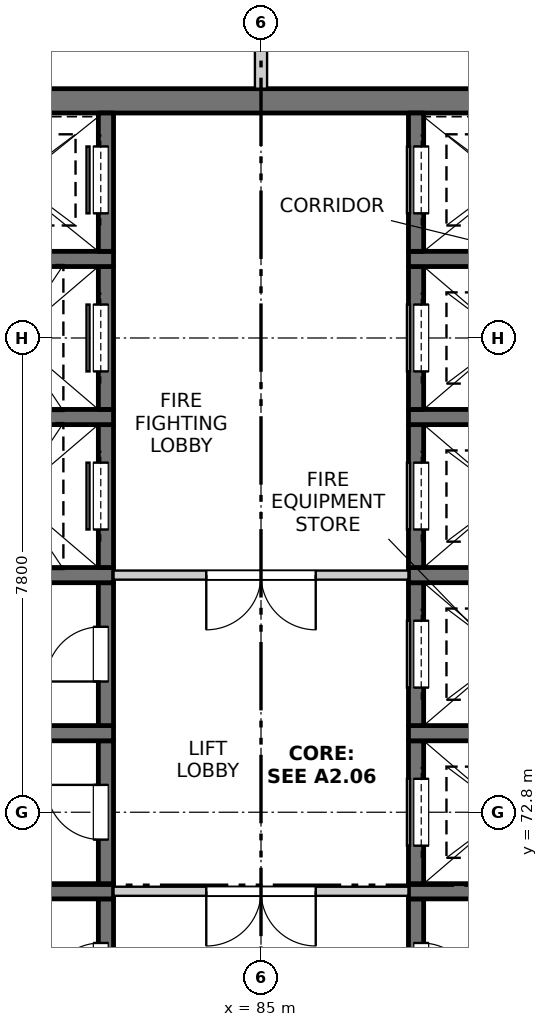
"""IFC4 building model, lengths in metres.
Left out: names, types, materials, properties, quantities, classifications, styles, units other than length and angle.
Written with IfcOpenShell. Run it as: python <this file> out.ifc"""

import sys

from ifc_helpers import new_model, si_unit, direction, frame, frame_2d, origin, place, context, subcontext, project, spatial, rectangle, extrude, element, fill, save


model = new_model("IFC4")
c1 = context("Model", 3, precision=1e-05, world=origin(), true_north=direction((0.0, 1.0)))
c2 = subcontext(c1, "Body", "Model", "MODEL_VIEW")
j1 = project(units=[si_unit("LENGTHUNIT", "METRE"), si_unit("PLANEANGLEUNIT", "RADIAN")], contexts=[c1])
p1 = place(None, origin())
s1 = spatial("IfcSite", under=j1, at=p1, CompositionType="ELEMENT")
p2 = place(p1, origin())
s2 = spatial("IfcBuilding", under=s1, at=p2, CompositionType="ELEMENT")
p3 = place(p2, frame((0.0, 0.0, 234.7)))
s3 = spatial("IfcBuildingStorey", under=s2, at=p3, CompositionType="ELEMENT", Elevation=234.7)
p4 = place(p3, frame((75.45, 84.5, -0.25), z_axis=(0.0, 0.0, 1.0), x_axis=(1.0, 0.0, 0.0)))
e1 = element("IfcWall", 1, at=p4, inside=s3, PredefinedType="SOLIDWALL", context=c2, shape_type="SweptSolid", body=[
    extrude(rectangle(XDim=19.1, YDim=0.4, at=frame_2d((9.55, 0.0))), origin(), (0.0, 0.0, 1.0), 3.4),
])
p5 = place(p3, frame((82.45, 69.025, -0.25), z_axis=(0.0, 0.0, 1.0), x_axis=(0.0, 1.0, 0.0)))
e2 = element("IfcWall", 2, at=p5, inside=s3, PredefinedType="SOLIDWALL", context=c2, shape_type="SweptSolid", body=[
    extrude(rectangle(XDim=2.35, YDim=0.25, at=frame_2d((1.175, 0.0))), origin(), (0.0, 0.0, 1.0), 3.4),
])
p6 = place(p5, frame((0.725, 0.0, 0.25)))
e3 = element("IfcOpeningElement", 3, at=p6, cuts=e2, PredefinedType="OPENING", context=c2, shape_type="SweptSolid", body=[
    extrude(rectangle(XDim=0.9, YDim=2.1, at=frame_2d((0.45, 1.05))), frame((0.0, 0.135, 0.0), z_axis=(0.0, -1.0, 0.0), x_axis=(1.0, 0.0, 0.0)), (0.0, 0.0, 1.0), 0.27),
])
p7 = place(p3, frame((79.575, 71.5, -0.25), z_axis=(0.0, 0.0, 1.0), x_axis=(1.0, 0.0, 0.0)))
e4 = element("IfcWall", 4, at=p7, inside=s3, PredefinedType="SOLIDWALL", context=c2, shape_type="SweptSolid", body=[
    extrude(rectangle(XDim=3.0, YDim=0.25, at=frame_2d((1.5, 0.0))), origin(), (0.0, 0.0, 1.0), 3.4),
])
p8 = place(p3, frame((82.45, 71.625, -0.25), z_axis=(0.0, 0.0, 1.0), x_axis=(0.0, 1.0, 0.0)))
e5 = element("IfcWall", 5, at=p8, inside=s3, PredefinedType="SOLIDWALL", context=c2, shape_type="SweptSolid", body=[
    extrude(rectangle(XDim=2.35, YDim=0.25, at=frame_2d((1.175, 0.0))), origin(), (0.0, 0.0, 1.0), 3.4),
])
p9 = place(p8, frame((0.725, 0.0, 0.25)))
e6 = element("IfcOpeningElement", 6, at=p9, cuts=e5, PredefinedType="OPENING", context=c2, shape_type="SweptSolid", body=[
    extrude(rectangle(XDim=0.9, YDim=2.1, at=frame_2d((0.45, 1.05))), frame((0.0, 0.135, 0.0), z_axis=(0.0, -1.0, 0.0), x_axis=(1.0, 0.0, 0.0)), (0.0, 0.0, 1.0), 0.27),
])
p10 = place(p3, frame((79.575, 74.1, -0.25), z_axis=(0.0, 0.0, 1.0), x_axis=(1.0, 0.0, 0.0)))
e7 = element("IfcWall", 7, at=p10, inside=s3, PredefinedType="SOLIDWALL", context=c2, shape_type="SweptSolid", body=[
    extrude(rectangle(XDim=3.0, YDim=0.25, at=frame_2d((1.5, 0.0))), origin(), (0.0, 0.0, 1.0), 3.4),
])
p11 = place(p3, frame((82.45, 74.225, -0.25), z_axis=(0.0, 0.0, 1.0), x_axis=(0.0, 1.0, 0.0)))
e8 = element("IfcWall", 8, at=p11, inside=s3, PredefinedType="SOLIDWALL", context=c2, shape_type="SweptSolid", body=[
    extrude(rectangle(XDim=2.35, YDim=0.25, at=frame_2d((1.175, 0.0))), origin(), (0.0, 0.0, 1.0), 3.4),
])
p12 = place(p11, frame((0.725, 0.0, 0.25)))
e9 = element("IfcOpeningElement", 9, at=p12, cuts=e8, PredefinedType="OPENING", context=c2, shape_type="SweptSolid", body=[
    extrude(rectangle(XDim=0.9, YDim=2.1, at=frame_2d((0.45, 1.05))), frame((0.0, 0.135, 0.0), z_axis=(0.0, -1.0, 0.0), x_axis=(1.0, 0.0, 0.0)), (0.0, 0.0, 1.0), 0.27),
])
p13 = place(p3, frame((79.575, 76.7, -0.25), z_axis=(0.0, 0.0, 1.0), x_axis=(1.0, 0.0, 0.0)))
e10 = element("IfcWall", 10, at=p13, inside=s3, PredefinedType="SOLIDWALL", context=c2, shape_type="SweptSolid", body=[
    extrude(rectangle(XDim=3.0, YDim=0.25, at=frame_2d((1.5, 0.0))), origin(), (0.0, 0.0, 1.0), 3.4),
])
p14 = place(p3, frame((82.45, 76.825, -0.25), z_axis=(0.0, 0.0, 1.0), x_axis=(0.0, 1.0, 0.0)))
e11 = element("IfcWall", 11, at=p14, inside=s3, PredefinedType="SOLIDWALL", context=c2, shape_type="SweptSolid", body=[
    extrude(rectangle(XDim=2.35, YDim=0.25, at=frame_2d((1.175, 0.0))), origin(), (0.0, 0.0, 1.0), 3.4),
])
p15 = place(p14, frame((0.625, 0.0, 0.25)))
e12 = element("IfcOpeningElement", 12, at=p15, cuts=e11, PredefinedType="OPENING", context=c2, shape_type="SweptSolid", body=[
    extrude(rectangle(XDim=1.1, YDim=2.1, at=frame_2d((0.55, 1.05))), frame((0.0, 0.135, 0.0), z_axis=(0.0, -1.0, 0.0), x_axis=(1.0, 0.0, 0.0)), (0.0, 0.0, 1.0), 0.27),
])
p16 = place(p3, frame((79.575, 79.3, -0.25), z_axis=(0.0, 0.0, 1.0), x_axis=(1.0, 0.0, 0.0)))
e13 = element("IfcWall", 13, at=p16, inside=s3, PredefinedType="SOLIDWALL", context=c2, shape_type="SweptSolid", body=[
    extrude(rectangle(XDim=3.0, YDim=0.25, at=frame_2d((1.5, 0.0))), origin(), (0.0, 0.0, 1.0), 3.4),
])
p17 = place(p3, frame((82.45, 79.425, -0.25), z_axis=(0.0, 0.0, 1.0), x_axis=(0.0, 1.0, 0.0)))
e14 = element("IfcWall", 14, at=p17, inside=s3, PredefinedType="SOLIDWALL", context=c2, shape_type="SweptSolid", body=[
    extrude(rectangle(XDim=2.35, YDim=0.25, at=frame_2d((1.175, 0.0))), origin(), (0.0, 0.0, 1.0), 3.4),
])
p18 = place(p17, frame((0.625, 0.0, 0.25)))
e15 = element("IfcOpeningElement", 15, at=p18, cuts=e14, PredefinedType="OPENING", context=c2, shape_type="SweptSolid", body=[
    extrude(rectangle(XDim=1.1, YDim=2.1, at=frame_2d((0.55, 1.05))), frame((0.0, 0.135, 0.0), z_axis=(0.0, -1.0, 0.0), x_axis=(1.0, 0.0, 0.0)), (0.0, 0.0, 1.0), 0.27),
])
p19 = place(p3, frame((79.575, 81.9, -0.25), z_axis=(0.0, 0.0, 1.0), x_axis=(1.0, 0.0, 0.0)))
e16 = element("IfcWall", 16, at=p19, inside=s3, PredefinedType="SOLIDWALL", context=c2, shape_type="SweptSolid", body=[
    extrude(rectangle(XDim=3.0, YDim=0.25, at=frame_2d((1.5, 0.0))), origin(), (0.0, 0.0, 1.0), 3.4),
])
p20 = place(p3, frame((82.45, 82.025, -0.25), z_axis=(0.0, 0.0, 1.0), x_axis=(0.0, 1.0, 0.0)))
e17 = element("IfcWall", 17, at=p20, inside=s3, PredefinedType="SOLIDWALL", context=c2, shape_type="SweptSolid", body=[
    extrude(rectangle(XDim=2.275, YDim=0.25, at=frame_2d((1.138, 0.0))), origin(), (0.0, 0.0, 1.0), 3.4),
])
p21 = place(p20, frame((0.625, 0.0, 0.25)))
e18 = element("IfcOpeningElement", 18, at=p21, cuts=e17, PredefinedType="OPENING", context=c2, shape_type="SweptSolid", body=[
    extrude(rectangle(XDim=1.1, YDim=2.1, at=frame_2d((0.55, 1.05))), frame((0.0, 0.135, 0.0), z_axis=(0.0, -1.0, 0.0), x_axis=(1.0, 0.0, 0.0)), (0.0, 0.0, 1.0), 0.27),
])
p22 = place(p3, frame((87.55, 69.025, -0.25), z_axis=(0.0, 0.0, 1.0), x_axis=(0.0, 1.0, 0.0)))
e19 = element("IfcWall", 19, at=p22, inside=s3, PredefinedType="SOLIDWALL", context=c2, shape_type="SweptSolid", body=[
    extrude(rectangle(XDim=2.35, YDim=0.25, at=frame_2d((1.175, 0.0))), origin(), (0.0, 0.0, 1.0), 3.4),
])
p23 = place(p22, frame((0.725, 0.0, 0.25)))
e20 = element("IfcOpeningElement", 20, at=p23, cuts=e19, PredefinedType="OPENING", context=c2, shape_type="SweptSolid", body=[
    extrude(rectangle(XDim=0.9, YDim=2.1, at=frame_2d((0.45, 1.05))), frame((0.0, 0.135, 0.0), z_axis=(0.0, -1.0, 0.0), x_axis=(1.0, 0.0, 0.0)), (0.0, 0.0, 1.0), 0.27),
])
p24 = place(p3, frame((87.425, 71.5, -0.25), z_axis=(0.0, 0.0, 1.0), x_axis=(1.0, 0.0, 0.0)))
e21 = element("IfcWall", 21, at=p24, inside=s3, PredefinedType="SOLIDWALL", context=c2, shape_type="SweptSolid", body=[
    extrude(rectangle(XDim=3.0, YDim=0.25, at=frame_2d((1.5, 0.0))), origin(), (0.0, 0.0, 1.0), 3.4),
])
p25 = place(p3, frame((87.55, 71.625, -0.25), z_axis=(0.0, 0.0, 1.0), x_axis=(0.0, 1.0, 0.0)))
e22 = element("IfcWall", 22, at=p25, inside=s3, PredefinedType="SOLIDWALL", context=c2, shape_type="SweptSolid", body=[
    extrude(rectangle(XDim=2.35, YDim=0.25, at=frame_2d((1.175, 0.0))), origin(), (0.0, 0.0, 1.0), 3.4),
])
p26 = place(p25, frame((0.625, 0.0, 0.25)))
e23 = element("IfcOpeningElement", 23, at=p26, cuts=e22, PredefinedType="OPENING", context=c2, shape_type="SweptSolid", body=[
    extrude(rectangle(XDim=1.1, YDim=2.1, at=frame_2d((0.55, 1.05))), frame((0.0, 0.135, 0.0), z_axis=(0.0, -1.0, 0.0), x_axis=(1.0, 0.0, 0.0)), (0.0, 0.0, 1.0), 0.27),
])
p27 = place(p3, frame((87.425, 74.1, -0.25), z_axis=(0.0, 0.0, 1.0), x_axis=(1.0, 0.0, 0.0)))
e24 = element("IfcWall", 24, at=p27, inside=s3, PredefinedType="SOLIDWALL", context=c2, shape_type="SweptSolid", body=[
    extrude(rectangle(XDim=3.0, YDim=0.25, at=frame_2d((1.5, 0.0))), origin(), (0.0, 0.0, 1.0), 3.4),
])
p28 = place(p3, frame((87.55, 74.225, -0.25), z_axis=(0.0, 0.0, 1.0), x_axis=(0.0, 1.0, 0.0)))
e25 = element("IfcWall", 25, at=p28, inside=s3, PredefinedType="SOLIDWALL", context=c2, shape_type="SweptSolid", body=[
    extrude(rectangle(XDim=2.35, YDim=0.25, at=frame_2d((1.175, 0.0))), origin(), (0.0, 0.0, 1.0), 3.4),
])
p29 = place(p28, frame((0.625, 0.0, 0.25)))
e26 = element("IfcOpeningElement", 26, at=p29, cuts=e25, PredefinedType="OPENING", context=c2, shape_type="SweptSolid", body=[
    extrude(rectangle(XDim=1.1, YDim=2.1, at=frame_2d((0.55, 1.05))), frame((0.0, 0.135, 0.0), z_axis=(0.0, -1.0, 0.0), x_axis=(1.0, 0.0, 0.0)), (0.0, 0.0, 1.0), 0.27),
])
p30 = place(p3, frame((87.425, 76.7, -0.25), z_axis=(0.0, 0.0, 1.0), x_axis=(1.0, 0.0, 0.0)))
e27 = element("IfcWall", 27, at=p30, inside=s3, PredefinedType="SOLIDWALL", context=c2, shape_type="SweptSolid", body=[
    extrude(rectangle(XDim=3.0, YDim=0.25, at=frame_2d((1.5, 0.0))), origin(), (0.0, 0.0, 1.0), 3.4),
])
p31 = place(p3, frame((87.55, 76.825, -0.25), z_axis=(0.0, 0.0, 1.0), x_axis=(0.0, 1.0, 0.0)))
e28 = element("IfcWall", 28, at=p31, inside=s3, PredefinedType="SOLIDWALL", context=c2, shape_type="SweptSolid", body=[
    extrude(rectangle(XDim=2.35, YDim=0.25, at=frame_2d((1.175, 0.0))), origin(), (0.0, 0.0, 1.0), 3.4),
])
p32 = place(p31, frame((0.625, 0.0, 0.25)))
e29 = element("IfcOpeningElement", 29, at=p32, cuts=e28, PredefinedType="OPENING", context=c2, shape_type="SweptSolid", body=[
    extrude(rectangle(XDim=1.1, YDim=2.1, at=frame_2d((0.55, 1.05))), frame((0.0, 0.135, 0.0), z_axis=(0.0, -1.0, 0.0), x_axis=(1.0, 0.0, 0.0)), (0.0, 0.0, 1.0), 0.27),
])
p33 = place(p3, frame((87.425, 79.3, -0.25), z_axis=(0.0, 0.0, 1.0), x_axis=(1.0, 0.0, 0.0)))
e30 = element("IfcWall", 30, at=p33, inside=s3, PredefinedType="SOLIDWALL", context=c2, shape_type="SweptSolid", body=[
    extrude(rectangle(XDim=3.0, YDim=0.25, at=frame_2d((1.5, 0.0))), origin(), (0.0, 0.0, 1.0), 3.4),
])
p34 = place(p3, frame((87.55, 79.425, -0.25), z_axis=(0.0, 0.0, 1.0), x_axis=(0.0, 1.0, 0.0)))
e31 = element("IfcWall", 31, at=p34, inside=s3, PredefinedType="SOLIDWALL", context=c2, shape_type="SweptSolid", body=[
    extrude(rectangle(XDim=2.35, YDim=0.25, at=frame_2d((1.175, 0.0))), origin(), (0.0, 0.0, 1.0), 3.4),
])
p35 = place(p34, frame((0.625, 0.0, 0.25)))
e32 = element("IfcOpeningElement", 32, at=p35, cuts=e31, PredefinedType="OPENING", context=c2, shape_type="SweptSolid", body=[
    extrude(rectangle(XDim=1.1, YDim=2.1, at=frame_2d((0.55, 1.05))), frame((0.0, 0.135, 0.0), z_axis=(0.0, -1.0, 0.0), x_axis=(1.0, 0.0, 0.0)), (0.0, 0.0, 1.0), 0.27),
])
p36 = place(p3, frame((87.425, 81.9, -0.25), z_axis=(0.0, 0.0, 1.0), x_axis=(1.0, 0.0, 0.0)))
e33 = element("IfcWall", 33, at=p36, inside=s3, PredefinedType="SOLIDWALL", context=c2, shape_type="SweptSolid", body=[
    extrude(rectangle(XDim=3.0, YDim=0.25, at=frame_2d((1.5, 0.0))), origin(), (0.0, 0.0, 1.0), 3.4),
])
p37 = place(p3, frame((87.55, 82.025, -0.25), z_axis=(0.0, 0.0, 1.0), x_axis=(0.0, 1.0, 0.0)))
e34 = element("IfcWall", 34, at=p37, inside=s3, PredefinedType="SOLIDWALL", context=c2, shape_type="SweptSolid", body=[
    extrude(rectangle(XDim=2.275, YDim=0.25, at=frame_2d((1.138, 0.0))), origin(), (0.0, 0.0, 1.0), 3.4),
])
p38 = place(p37, frame((0.625, 0.0, 0.25)))
e35 = element("IfcOpeningElement", 35, at=p38, cuts=e34, PredefinedType="OPENING", context=c2, shape_type="SweptSolid", body=[
    extrude(rectangle(XDim=1.1, YDim=2.1, at=frame_2d((0.55, 1.05))), frame((0.0, 0.135, 0.0), z_axis=(0.0, -1.0, 0.0), x_axis=(1.0, 0.0, 0.0)), (0.0, 0.0, 1.0), 0.27),
])
p39 = place(p3, frame((82.575, 71.5, 0.0), z_axis=(0.0, 0.0, 1.0), x_axis=(1.0, 0.0, 0.0)))
e36 = element("IfcWall", 36, at=p39, inside=s3, PredefinedType="PARTITIONING", context=c2, shape_type="SweptSolid", body=[
    extrude(rectangle(XDim=4.85, YDim=0.15, at=frame_2d((2.425, 0.0))), origin(), (0.0, 0.0, 1.0), 3.15),
])
p40 = place(p39, frame((1.525, 0.0, 0.0)))
e37 = element("IfcOpeningElement", 37, at=p40, cuts=e36, PredefinedType="OPENING", context=c2, shape_type="SweptSolid", body=[
    extrude(rectangle(XDim=1.8, YDim=2.1, at=frame_2d((0.9, 1.05))), frame((0.0, 0.085, 0.0), z_axis=(0.0, -1.0, 0.0), x_axis=(1.0, 0.0, 0.0)), (0.0, 0.0, 1.0), 0.17),
])
p41 = place(p3, frame((82.575, 76.7, 0.0), z_axis=(0.0, 0.0, 1.0), x_axis=(1.0, 0.0, 0.0)))
e38 = element("IfcWall", 38, at=p41, inside=s3, PredefinedType="PARTITIONING", context=c2, shape_type="SweptSolid", body=[
    extrude(rectangle(XDim=4.85, YDim=0.15, at=frame_2d((2.425, 0.0))), origin(), (0.0, 0.0, 1.0), 3.15),
])
p42 = place(p41, frame((1.525, 0.0, 0.0)))
e39 = element("IfcOpeningElement", 39, at=p42, cuts=e38, PredefinedType="OPENING", context=c2, shape_type="SweptSolid", body=[
    extrude(rectangle(XDim=1.8, YDim=2.1, at=frame_2d((0.9, 1.05))), frame((0.0, 0.085, 0.0), z_axis=(0.0, -1.0, 0.0), x_axis=(1.0, 0.0, 0.0)), (0.0, 0.0, 1.0), 0.17),
])
p43 = place(p3, frame((85.0, 84.7, 0.0), z_axis=(0.0, 0.0, 1.0), x_axis=(0.0, 1.0, 0.0)))
e40 = element("IfcWall", 40, at=p43, inside=s3, PredefinedType="PARTITIONING", context=c2, shape_type="SweptSolid", body=[
    extrude(rectangle(XDim=3.4, YDim=0.2, at=frame_2d((1.7, 0.0))), origin(), (0.0, 0.0, 1.0), 3.15),
])
p44 = place(p6, origin())
e41 = element("IfcDoor", 41, at=p44, inside=s3, OperationType="SINGLE_SWING_LEFT", PredefinedType="DOOR", context=c2, shape_type="SweptSolid", body=[
    extrude(rectangle(XDim=0.9, YDim=2.1, at=frame_2d((0.45, 1.05))), frame((0.0, 0.11, 0.0), z_axis=(0.0, -1.0, 0.0), x_axis=(1.0, 0.0, 0.0)), (0.0, 0.0, 1.0), 0.05),
])
fill(e3, e41)
p45 = place(p23, origin())
e42 = element("IfcDoor", 42, at=p45, inside=s3, OperationType="SINGLE_SWING_RIGHT", PredefinedType="DOOR", context=c2, shape_type="SweptSolid", body=[
    extrude(rectangle(XDim=0.9, YDim=2.1, at=frame_2d((0.45, 1.05))), frame((0.0, -0.06, 0.0), z_axis=(0.0, -1.0, 0.0), x_axis=(1.0, 0.0, 0.0)), (0.0, 0.0, 1.0), 0.05),
])
fill(e20, e42)
p46 = place(p40, origin())
e43 = element("IfcDoor", 43, at=p46, inside=s3, OperationType="DOUBLE_DOOR_SINGLE_SWING", PredefinedType="DOOR", context=c2, shape_type="SweptSolid", body=[
    extrude(rectangle(XDim=1.8, YDim=2.1, at=frame_2d((0.9, 1.05))), frame((0.0, 0.025, 0.0), z_axis=(0.0, -1.0, 0.0), x_axis=(1.0, 0.0, 0.0)), (0.0, 0.0, 1.0), 0.05),
])
fill(e37, e43)
p47 = place(p9, origin())
e44 = element("IfcDoor", 44, at=p47, inside=s3, OperationType="SINGLE_SWING_RIGHT", PredefinedType="DOOR", context=c2, shape_type="SweptSolid", body=[
    extrude(rectangle(XDim=0.9, YDim=2.1, at=frame_2d((0.45, 1.05))), frame((0.0, 0.11, 0.0), z_axis=(0.0, -1.0, 0.0), x_axis=(1.0, 0.0, 0.0)), (0.0, 0.0, 1.0), 0.05),
])
fill(e6, e44)
p48 = place(p26, origin())
e45 = element("IfcDoor", 45, at=p48, inside=s3, OperationType="SLIDING_TO_LEFT", PredefinedType="DOOR", context=c2, shape_type="SweptSolid", body=[
    extrude(rectangle(XDim=1.1, YDim=2.1, at=frame_2d((0.55, 1.05))), frame((0.0, -0.06, 0.0), z_axis=(0.0, -1.0, 0.0), x_axis=(1.0, 0.0, 0.0)), (0.0, 0.0, 1.0), 0.05),
])
fill(e23, e45)
p49 = place(p12, origin())
e46 = element("IfcDoor", 46, at=p49, inside=s3, OperationType="SINGLE_SWING_LEFT", PredefinedType="DOOR", context=c2, shape_type="SweptSolid", body=[
    extrude(rectangle(XDim=0.9, YDim=2.1, at=frame_2d((0.45, 1.05))), frame((0.0, 0.11, 0.0), z_axis=(0.0, -1.0, 0.0), x_axis=(1.0, 0.0, 0.0)), (0.0, 0.0, 1.0), 0.05),
])
fill(e9, e46)
p50 = place(p29, origin())
e47 = element("IfcDoor", 47, at=p50, inside=s3, OperationType="SLIDING_TO_LEFT", PredefinedType="DOOR", context=c2, shape_type="SweptSolid", body=[
    extrude(rectangle(XDim=1.1, YDim=2.1, at=frame_2d((0.55, 1.05))), frame((0.0, -0.06, 0.0), z_axis=(0.0, -1.0, 0.0), x_axis=(1.0, 0.0, 0.0)), (0.0, 0.0, 1.0), 0.05),
])
fill(e26, e47)
p51 = place(p42, origin())
e48 = element("IfcDoor", 48, at=p51, inside=s3, OperationType="DOUBLE_DOOR_SINGLE_SWING", PredefinedType="DOOR", context=c2, shape_type="SweptSolid", body=[
    extrude(rectangle(XDim=1.8, YDim=2.1, at=frame_2d((0.9, 1.05))), frame((0.0, 0.025, 0.0), z_axis=(0.0, -1.0, 0.0), x_axis=(1.0, 0.0, 0.0)), (0.0, 0.0, 1.0), 0.05),
])
fill(e39, e48)
p52 = place(p15, origin())
e49 = element("IfcDoor", 49, at=p52, inside=s3, OperationType="SLIDING_TO_LEFT", PredefinedType="DOOR", context=c2, shape_type="SweptSolid", body=[
    extrude(rectangle(XDim=1.1, YDim=2.1, at=frame_2d((0.55, 1.05))), frame((0.0, 0.11, 0.0), z_axis=(0.0, -1.0, 0.0), x_axis=(1.0, 0.0, 0.0)), (0.0, 0.0, 1.0), 0.05),
])
fill(e12, e49)
p53 = place(p32, origin())
e50 = element("IfcDoor", 50, at=p53, inside=s3, OperationType="SLIDING_TO_LEFT", PredefinedType="DOOR", context=c2, shape_type="SweptSolid", body=[
    extrude(rectangle(XDim=1.1, YDim=2.1, at=frame_2d((0.55, 1.05))), frame((0.0, -0.06, 0.0), z_axis=(0.0, -1.0, 0.0), x_axis=(1.0, 0.0, 0.0)), (0.0, 0.0, 1.0), 0.05),
])
fill(e29, e50)
p54 = place(p18, origin())
e51 = element("IfcDoor", 51, at=p54, inside=s3, OperationType="SLIDING_TO_LEFT", PredefinedType="DOOR", context=c2, shape_type="SweptSolid", body=[
    extrude(rectangle(XDim=1.1, YDim=2.1, at=frame_2d((0.55, 1.05))), frame((0.0, 0.11, 0.0), z_axis=(0.0, -1.0, 0.0), x_axis=(1.0, 0.0, 0.0)), (0.0, 0.0, 1.0), 0.05),
])
fill(e15, e51)
p55 = place(p35, origin())
e52 = element("IfcDoor", 52, at=p55, inside=s3, OperationType="SLIDING_TO_RIGHT", PredefinedType="DOOR", context=c2, shape_type="SweptSolid", body=[
    extrude(rectangle(XDim=1.1, YDim=2.1, at=frame_2d((0.55, 1.05))), frame((0.0, -0.06, 0.0), z_axis=(0.0, -1.0, 0.0), x_axis=(1.0, 0.0, 0.0)), (0.0, 0.0, 1.0), 0.05),
])
fill(e32, e52)
p56 = place(p21, origin())
e53 = element("IfcDoor", 53, at=p56, inside=s3, OperationType="SLIDING_TO_RIGHT", PredefinedType="DOOR", context=c2, shape_type="SweptSolid", body=[
    extrude(rectangle(XDim=1.1, YDim=2.1, at=frame_2d((0.55, 1.05))), frame((0.0, 0.11, 0.0), z_axis=(0.0, -1.0, 0.0), x_axis=(1.0, 0.0, 0.0)), (0.0, 0.0, 1.0), 0.05),
])
fill(e18, e53)
p57 = place(p38, origin())
e54 = element("IfcDoor", 54, at=p57, inside=s3, OperationType="SLIDING_TO_RIGHT", PredefinedType="DOOR", context=c2, shape_type="SweptSolid", body=[
    extrude(rectangle(XDim=1.1, YDim=2.1, at=frame_2d((0.55, 1.05))), frame((0.0, -0.06, 0.0), z_axis=(0.0, -1.0, 0.0), x_axis=(1.0, 0.0, 0.0)), (0.0, 0.0, 1.0), 0.05),
])
fill(e35, e54)
save(model, sys.argv[1])
